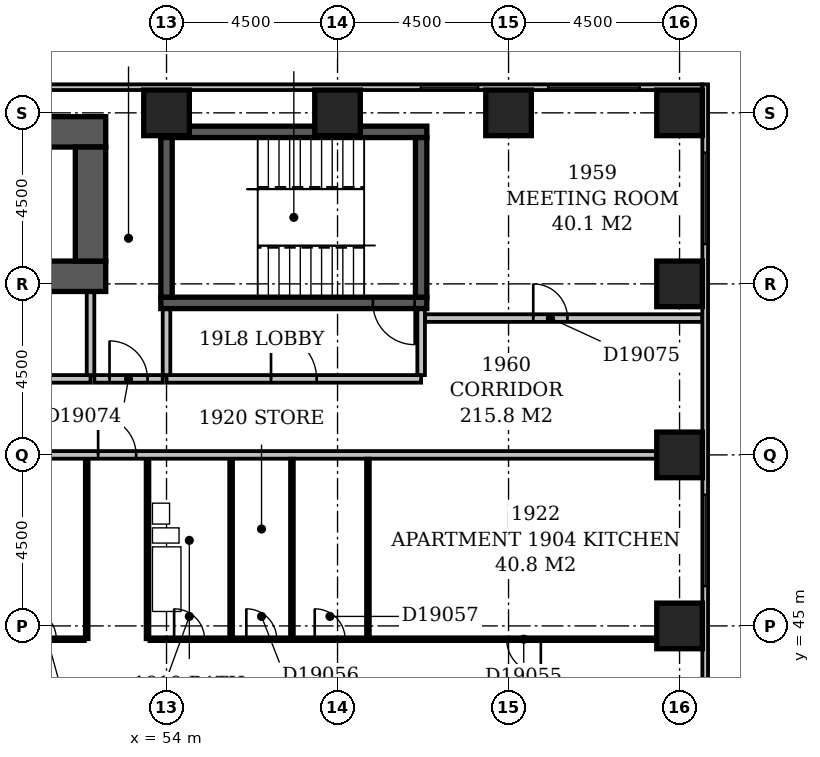
"""IFC4 building model, lengths in metres.
Left out: names, types, materials, properties, quantities, classifications, styles, units other than length and angle.
Written with IfcOpenShell. Run it as: python <this file> out.ifc"""

import sys

from ifc_helpers import new_model, si_unit, direction, frame, frame_2d, origin, origin_2d, place, context, subcontext, project, spatial, rectangle, extrude, element, fill, save


model = new_model("IFC4")
c1 = context("Model", 3, precision=1e-05, world=origin(), true_north=direction((0.0, 1.0)))
c2 = subcontext(c1, "Body", "Model", "MODEL_VIEW")
j1 = project(units=[si_unit("LENGTHUNIT", "METRE"), si_unit("PLANEANGLEUNIT", "RADIAN")], contexts=[c1])
p1 = place(None, origin())
s1 = spatial("IfcSite", under=j1, at=p1, CompositionType="ELEMENT")
p2 = place(p1, origin())
s2 = spatial("IfcBuilding", under=s1, at=p2, CompositionType="ELEMENT")
p3 = place(p2, frame((0.0, 0.0, 79.4)))
s3 = spatial("IfcBuildingStorey", under=s2, at=p3, CompositionType="ELEMENT", Elevation=79.4)
for number, where, z_axis, x_axis in (
    (1, (47.0, 54.2, -0.3), (0.0, 0.0, 1.0), (1.0, 0.0, 0.0)),
    (2, (47.0, 58.0, -0.3), (0.0, 0.0, 1.0), (1.0, 0.0, 0.0)),
):
    element("IfcWall", number, at=place(p3, frame(where, z_axis=z_axis, x_axis=x_axis)), inside=s3, PredefinedType="SHEAR", context=c2, shape_type="SweptSolid", body=[
        extrude(rectangle(XDim=5.4, YDim=0.8, at=frame_2d((2.7, 0.0))), origin(), (0.0, 0.0, 1.0), 3.6),
    ])
p4 = place(p3, frame((52.0, 54.6, -0.3), z_axis=(0.0, 0.0, 1.0), x_axis=(0.0, 1.0, 0.0)))
e3 = element("IfcWall", 3, at=p4, inside=s3, PredefinedType="SHEAR", context=c2, shape_type="SweptSolid", body=[
    extrude(rectangle(XDim=3.0, YDim=0.8, at=frame_2d((1.5, 0.0))), origin(), (0.0, 0.0, 1.0), 3.6),
])
p5 = place(p3, frame((53.85, 53.5, -0.3), z_axis=(0.0, 0.0, 1.0), x_axis=(1.0, 0.0, 0.0)))
e4 = element("IfcWall", 4, at=p5, inside=s3, PredefinedType="SHEAR", context=c2, shape_type="SweptSolid", body=[
    extrude(rectangle(XDim=7.0, YDim=0.3, at=frame_2d((3.5, 0.0))), origin(), (0.0, 0.0, 1.0), 3.6),
])
p6 = place(p5, frame((5.58, 0.0, 0.3)))
e5 = element("IfcOpeningElement", 5, at=p6, cuts=e4, PredefinedType="OPENING", context=c2, shape_type="SweptSolid", body=[
    extrude(rectangle(XDim=1.1, YDim=2.1, at=frame_2d((0.55, 1.05))), frame((0.0, 0.162, 0.0), z_axis=(0.0, -1.0, 0.0), x_axis=(1.0, 0.0, 0.0)), (0.0, 0.0, 1.0), 0.324),
])
p7 = place(p3, frame((53.85, 58.0, -0.3), z_axis=(0.0, 0.0, 1.0), x_axis=(1.0, 0.0, 0.0)))
e6 = element("IfcWall", 6, at=p7, inside=s3, PredefinedType="SHEAR", context=c2, shape_type="SweptSolid", body=[
    extrude(rectangle(XDim=7.0, YDim=0.3, at=frame_2d((3.5, 0.0))), origin(), (0.0, 0.0, 1.0), 3.6),
])
for number, where, z_axis, x_axis in (
    (7, (54.0, 53.65, -0.3), (0.0, 0.0, 1.0), (0.0, 1.0, 0.0)),
    (8, (60.7, 53.65, -0.3), (0.0, 0.0, 1.0), (0.0, 1.0, 0.0)),
):
    element("IfcWall", number, at=place(p3, frame(where, z_axis=z_axis, x_axis=x_axis)), inside=s3, PredefinedType="SHEAR", context=c2, shape_type="SweptSolid", body=[
        extrude(rectangle(XDim=4.2, YDim=0.3, at=frame_2d((2.1, 0.0))), origin(), (0.0, 0.0, 1.0), 3.6),
    ])
for number, where, z_axis, x_axis in (
    (9, (67.5, 45.0, -0.3), (0.0, 0.0, 1.0), (1.0, 0.0, 0.0)),
    (10, (67.5, 49.5, -0.3), (0.0, 0.0, 1.0), (1.0, 0.0, 0.0)),
    (11, (67.5, 54.0, -0.3), (0.0, 0.0, 1.0), (1.0, 0.0, 0.0)),
    (12, (54.0, 58.5, -0.3), (0.0, 0.0, 1.0), (1.0, 0.0, 0.0)),
    (13, (58.5, 58.5, -0.3), (0.0, 0.0, 1.0), (1.0, 0.0, 0.0)),
    (14, (63.0, 58.5, -0.3), (0.0, 0.0, 1.0), (1.0, 0.0, 0.0)),
    (15, (67.5, 58.5, -0.3), (0.0, 0.0, 1.0), (1.0, 0.0, 0.0)),
):
    element("IfcColumn", number, at=place(p3, frame(where, z_axis=z_axis, x_axis=x_axis)), inside=s3, PredefinedType="COLUMN", context=c2, shape_type="SweptSolid", body=[
        extrude(rectangle(XDim=1.2, YDim=1.2, at=origin_2d()), origin(), (0.0, 0.0, 1.0), 3.6),
    ])
p8 = place(p3, frame((68.175, 35.4, 0.0), z_axis=(0.0, 0.0, 1.0), x_axis=(0.0, 1.0, 0.0)))
e16 = element("IfcWall", 16, at=p8, inside=s3, PredefinedType="STANDARD", context=c2, shape_type="SweptSolid", body=[
    extrude(rectangle(XDim=23.85, YDim=0.15, at=frame_2d((11.925, 0.0))), origin(), (0.0, 0.0, 1.0), 2.7),
])
p9 = place(p8, frame((1.65, 0.0, 0.6)))
e17 = element("IfcOpeningElement", 17, at=p9, cuts=e16, PredefinedType="OPENING", context=c2, shape_type="SweptSolid", body=[
    extrude(rectangle(XDim=2.4, YDim=1.8, at=frame_2d((1.2, 0.9))), frame((0.0, 0.087, 0.0), z_axis=(0.0, -1.0, 0.0), x_axis=(1.0, 0.0, 0.0)), (0.0, 0.0, 1.0), 0.174),
])
p10 = place(p8, frame((10.65, 0.0, 0.6)))
e18 = element("IfcOpeningElement", 18, at=p10, cuts=e16, PredefinedType="OPENING", context=c2, shape_type="SweptSolid", body=[
    extrude(rectangle(XDim=2.4, YDim=1.8, at=frame_2d((1.2, 0.9))), frame((0.0, 0.087, 0.0), z_axis=(0.0, -1.0, 0.0), x_axis=(1.0, 0.0, 0.0)), (0.0, 0.0, 1.0), 0.174),
])
p11 = place(p8, frame((19.65, 0.0, 0.6)))
e19 = element("IfcOpeningElement", 19, at=p11, cuts=e16, PredefinedType="OPENING", context=c2, shape_type="SweptSolid", body=[
    extrude(rectangle(XDim=2.4, YDim=1.8, at=frame_2d((1.2, 0.9))), frame((0.0, 0.087, 0.0), z_axis=(0.0, -1.0, 0.0), x_axis=(1.0, 0.0, 0.0)), (0.0, 0.0, 1.0), 0.174),
])
p12 = place(p3, frame((68.1, 59.175, 0.0), z_axis=(0.0, 0.0, 1.0), x_axis=(-1.0, 0.0, 0.0)))
e20 = element("IfcWall", 20, at=p12, inside=s3, PredefinedType="STANDARD", context=c2, shape_type="SweptSolid", body=[
    extrude(rectangle(XDim=68.85, YDim=0.15, at=frame_2d((34.425, 0.0))), origin(), (0.0, 0.0, 1.0), 2.7),
])
p13 = place(p12, frame((1.65, 0.0, 0.6)))
e21 = element("IfcOpeningElement", 21, at=p13, cuts=e20, PredefinedType="OPENING", context=c2, shape_type="SweptSolid", body=[
    extrude(rectangle(XDim=2.4, YDim=1.8, at=frame_2d((1.2, 0.9))), frame((0.0, 0.087, 0.0), z_axis=(0.0, -1.0, 0.0), x_axis=(1.0, 0.0, 0.0)), (0.0, 0.0, 1.0), 0.174),
])
p14 = place(p12, frame((5.903, 0.0, 0.6)))
e22 = element("IfcOpeningElement", 22, at=p14, cuts=e20, PredefinedType="OPENING", context=c2, shape_type="SweptSolid", body=[
    extrude(rectangle(XDim=1.5, YDim=1.8, at=frame_2d((0.75, 0.9))), frame((0.0, 0.087, 0.0), z_axis=(0.0, -1.0, 0.0), x_axis=(1.0, 0.0, 0.0)), (0.0, 0.0, 1.0), 0.174),
])
p15 = place(p12, frame((37.65, 0.0, 0.6)))
e23 = element("IfcOpeningElement", 23, at=p15, cuts=e20, PredefinedType="OPENING", context=c2, shape_type="SweptSolid", body=[
    extrude(rectangle(XDim=2.4, YDim=1.8, at=frame_2d((1.2, 0.9))), frame((0.0, 0.087, 0.0), z_axis=(0.0, -1.0, 0.0), x_axis=(1.0, 0.0, 0.0)), (0.0, 0.0, 1.0), 0.174),
])
p16 = place(p3, frame((47.0, 51.5, 0.0), z_axis=(0.0, 0.0, 1.0), x_axis=(1.0, 0.0, 0.0)))
e24 = element("IfcWall", 24, at=p16, inside=s3, PredefinedType="PARTITIONING", context=c2, shape_type="SweptSolid", body=[
    extrude(rectangle(XDim=5.0, YDim=0.2, at=frame_2d((2.5, 0.0))), origin(), (0.0, 0.0, 1.0), 3.3),
])
p17 = place(p16, frame((1.9, 0.0, 0.0)))
e25 = element("IfcOpeningElement", 25, at=p17, cuts=e24, PredefinedType="OPENING", context=c2, shape_type="SweptSolid", body=[
    extrude(rectangle(XDim=1.2, YDim=2.1, at=frame_2d((0.6, 1.05))), frame((0.0, 0.112, 0.0), z_axis=(0.0, -1.0, 0.0), x_axis=(1.0, 0.0, 0.0)), (0.0, 0.0, 1.0), 0.224),
])
p18 = place(p3, frame((52.0, 51.6, 0.0), z_axis=(0.0, 0.0, 1.0), x_axis=(0.0, 1.0, 0.0)))
e26 = element("IfcWall", 26, at=p18, inside=s3, PredefinedType="PARTITIONING", context=c2, shape_type="SweptSolid", body=[
    extrude(rectangle(XDim=2.18, YDim=0.2, at=frame_2d((1.09, 0.0))), origin(), (0.0, 0.0, 1.0), 3.3),
])
p19 = place(p3, frame((54.0, 51.5, 0.0), z_axis=(0.0, 0.0, 1.0), x_axis=(1.0, 0.0, 0.0)))
e27 = element("IfcWall", 27, at=p19, inside=s3, PredefinedType="PARTITIONING", context=c2, shape_type="SweptSolid", body=[
    extrude(rectangle(XDim=6.7, YDim=0.2, at=frame_2d((3.35, 0.0))), origin(), (0.0, 0.0, 1.0), 3.3),
])
p20 = place(p19, frame((2.75, 0.0, 0.0)))
e28 = element("IfcOpeningElement", 28, at=p20, cuts=e27, PredefinedType="OPENING", context=c2, shape_type="SweptSolid", body=[
    extrude(rectangle(XDim=1.2, YDim=2.1, at=frame_2d((0.6, 1.05))), frame((0.0, 0.112, 0.0), z_axis=(0.0, -1.0, 0.0), x_axis=(1.0, 0.0, 0.0)), (0.0, 0.0, 1.0), 0.224),
])
p21 = place(p3, frame((60.7, 51.6, 0.0), z_axis=(0.0, 0.0, 1.0), x_axis=(0.0, 1.0, 0.0)))
e29 = element("IfcWall", 29, at=p21, inside=s3, PredefinedType="PARTITIONING", context=c2, shape_type="SweptSolid", body=[
    extrude(rectangle(XDim=1.73, YDim=0.2, at=frame_2d((0.865, 0.0))), origin(), (0.0, 0.0, 1.0), 3.3),
])
p22 = place(p3, frame((54.0, 51.6, 0.0), z_axis=(0.0, 0.0, 1.0), x_axis=(0.0, 1.0, 0.0)))
e30 = element("IfcWall", 30, at=p22, inside=s3, PredefinedType="PARTITIONING", context=c2, shape_type="SweptSolid", body=[
    extrude(rectangle(XDim=1.73, YDim=0.2, at=frame_2d((0.865, 0.0))), origin(), (0.0, 0.0, 1.0), 2.6),
])
p23 = place(p3, frame((49.6, 44.65, 0.0), z_axis=(0.0, 0.0, 1.0), x_axis=(1.0, 0.0, 0.0)))
e31 = element("IfcWall", 31, at=p23, inside=s3, PredefinedType="PARTITIONING", context=c2, shape_type="SweptSolid", body=[
    extrude(rectangle(XDim=2.25, YDim=0.1, at=frame_2d((1.125, 0.0))), origin(), (0.0, 0.0, 1.0), 3.3),
])
p24 = place(p23, frame((0.7, 0.0, 0.0)))
e32 = element("IfcOpeningElement", 32, at=p24, cuts=e31, PredefinedType="OPENING", context=c2, shape_type="SweptSolid", body=[
    extrude(rectangle(XDim=0.8, YDim=2.1, at=frame_2d((0.4, 1.05))), frame((0.0, 0.062, 0.0), z_axis=(0.0, -1.0, 0.0), x_axis=(1.0, 0.0, 0.0)), (0.0, 0.0, 1.0), 0.124),
])
p25 = place(p3, frame((51.9, 44.65, 0.0), z_axis=(0.0, 0.0, 1.0), x_axis=(0.0, 1.0, 0.0)))
e33 = element("IfcWall", 33, at=p25, inside=s3, PredefinedType="PLUMBINGWALL", context=c2, shape_type="SweptSolid", body=[
    extrude(rectangle(XDim=4.75, YDim=0.1, at=frame_2d((2.375, 0.0))), origin(), (0.0, 0.0, 1.0), 3.3),
])
p26 = place(p3, frame((53.5, 44.65, 0.0), z_axis=(0.0, 0.0, 1.0), x_axis=(0.0, 1.0, 0.0)))
e34 = element("IfcWall", 34, at=p26, inside=s3, PredefinedType="PLUMBINGWALL", context=c2, shape_type="SweptSolid", body=[
    extrude(rectangle(XDim=4.75, YDim=0.1, at=frame_2d((2.375, 0.0))), origin(), (0.0, 0.0, 1.0), 2.6),
])
p27 = place(p3, frame((53.55, 44.65, 0.0), z_axis=(0.0, 0.0, 1.0), x_axis=(1.0, 0.0, 0.0)))
e35 = element("IfcWall", 35, at=p27, inside=s3, PredefinedType="PARTITIONING", context=c2, shape_type="SweptSolid", body=[
    extrude(rectangle(XDim=13.35, YDim=0.1, at=frame_2d((6.675, 0.0))), origin(), (0.0, 0.0, 1.0), 3.3),
])
p28 = place(p27, frame((0.65, 0.0, 0.0)))
e36 = element("IfcOpeningElement", 36, at=p28, cuts=e35, PredefinedType="OPENING", context=c2, shape_type="SweptSolid", body=[
    extrude(rectangle(XDim=0.8, YDim=2.1, at=frame_2d((0.4, 1.05))), frame((0.0, 0.062, 0.0), z_axis=(0.0, -1.0, 0.0), x_axis=(1.0, 0.0, 0.0)), (0.0, 0.0, 1.0), 0.124),
])
p29 = place(p27, frame((9.4, 0.0, 0.0)))
e37 = element("IfcOpeningElement", 37, at=p29, cuts=e35, PredefinedType="OPENING", context=c2, shape_type="SweptSolid", body=[
    extrude(rectangle(XDim=0.9, YDim=2.1, at=frame_2d((0.45, 1.05))), frame((0.0, 0.062, 0.0), z_axis=(0.0, -1.0, 0.0), x_axis=(1.0, 0.0, 0.0)), (0.0, 0.0, 1.0), 0.124),
])
p30 = place(p27, frame((2.55, 0.0, 0.0)))
e38 = element("IfcOpeningElement", 38, at=p30, cuts=e35, PredefinedType="OPENING", context=c2, shape_type="SweptSolid", body=[
    extrude(rectangle(XDim=0.8, YDim=2.1, at=frame_2d((0.4, 1.05))), frame((0.0, 0.062, 0.0), z_axis=(0.0, -1.0, 0.0), x_axis=(1.0, 0.0, 0.0)), (0.0, 0.0, 1.0), 0.124),
])
p31 = place(p27, frame((4.35, 0.0, 0.0)))
e39 = element("IfcOpeningElement", 39, at=p31, cuts=e35, PredefinedType="OPENING", context=c2, shape_type="SweptSolid", body=[
    extrude(rectangle(XDim=0.8, YDim=2.1, at=frame_2d((0.4, 1.05))), frame((0.0, 0.062, 0.0), z_axis=(0.0, -1.0, 0.0), x_axis=(1.0, 0.0, 0.0)), (0.0, 0.0, 1.0), 0.124),
])
p32 = place(p3, frame((55.7, 44.7, 0.0), z_axis=(0.0, 0.0, 1.0), x_axis=(0.0, 1.0, 0.0)))
e40 = element("IfcWall", 40, at=p32, inside=s3, PredefinedType="PLUMBINGWALL", context=c2, shape_type="SweptSolid", body=[
    extrude(rectangle(XDim=4.7, YDim=0.1, at=frame_2d((2.35, 0.0))), origin(), (0.0, 0.0, 1.0), 3.3),
])
for number, where, z_axis, x_axis in (
    (41, (57.3, 44.7, 0.0), (0.0, 0.0, 1.0), (0.0, 1.0, 0.0)),
    (42, (59.3, 44.7, 0.0), (0.0, 0.0, 1.0), (0.0, 1.0, 0.0)),
):
    element("IfcWall", number, at=place(p3, frame(where, z_axis=z_axis, x_axis=x_axis)), inside=s3, PredefinedType="PARTITIONING", context=c2, shape_type="SweptSolid", body=[
        extrude(rectangle(XDim=4.7, YDim=0.1, at=frame_2d((2.35, 0.0))), origin(), (0.0, 0.0, 1.0), 3.3),
    ])
p33 = place(p3, frame((9.1, 49.5, 0.0), z_axis=(0.0, 0.0, 1.0), x_axis=(1.0, 0.0, 0.0)))
e43 = element("IfcWall", 43, at=p33, inside=s3, PredefinedType="PARTITIONING", context=c2, shape_type="SweptSolid", body=[
    extrude(rectangle(XDim=57.8, YDim=0.2, at=frame_2d((28.9, 0.0))), origin(), (0.0, 0.0, 1.0), 3.3),
])
p34 = place(p33, frame((18.7, 0.0, 0.0)))
e44 = element("IfcOpeningElement", 44, at=p34, cuts=e43, PredefinedType="OPENING", context=c2, shape_type="SweptSolid", body=[
    extrude(rectangle(XDim=1.0, YDim=2.1, at=frame_2d((0.5, 1.05))), frame((0.0, 0.112, 0.0), z_axis=(0.0, -1.0, 0.0), x_axis=(1.0, 0.0, 0.0)), (0.0, 0.0, 1.0), 0.224),
])
p35 = place(p33, frame((24.35, 0.0, 0.0)))
e45 = element("IfcOpeningElement", 45, at=p35, cuts=e43, PredefinedType="OPENING", context=c2, shape_type="SweptSolid", body=[
    extrude(rectangle(XDim=1.0, YDim=2.1, at=frame_2d((0.5, 1.05))), frame((0.0, 0.112, 0.0), z_axis=(0.0, -1.0, 0.0), x_axis=(1.0, 0.0, 0.0)), (0.0, 0.0, 1.0), 0.224),
])
p36 = place(p33, frame((27.2, 0.0, 0.0)))
e46 = element("IfcOpeningElement", 46, at=p36, cuts=e43, PredefinedType="OPENING", context=c2, shape_type="SweptSolid", body=[
    extrude(rectangle(XDim=1.0, YDim=2.1, at=frame_2d((0.5, 1.05))), frame((0.0, 0.112, 0.0), z_axis=(0.0, -1.0, 0.0), x_axis=(1.0, 0.0, 0.0)), (0.0, 0.0, 1.0), 0.224),
])
p37 = place(p33, frame((43.1, 0.0, 0.0)))
e47 = element("IfcOpeningElement", 47, at=p37, cuts=e43, PredefinedType="OPENING", context=c2, shape_type="SweptSolid", body=[
    extrude(rectangle(XDim=1.0, YDim=2.1, at=frame_2d((0.5, 1.05))), frame((0.0, 0.112, 0.0), z_axis=(0.0, -1.0, 0.0), x_axis=(1.0, 0.0, 0.0)), (0.0, 0.0, 1.0), 0.224),
])
p38 = place(p33, frame((3.9, 0.0, 0.0)))
e48 = element("IfcOpeningElement", 48, at=p38, cuts=e43, PredefinedType="OPENING", context=c2, shape_type="SweptSolid", body=[
    extrude(rectangle(XDim=0.9, YDim=2.1, at=frame_2d((0.45, 1.05))), frame((0.0, 0.112, 0.0), z_axis=(0.0, -1.0, 0.0), x_axis=(1.0, 0.0, 0.0)), (0.0, 0.0, 1.0), 0.224),
])
p39 = place(p3, frame((52.1, 51.5, 0.0), z_axis=(0.0, 0.0, 1.0), x_axis=(1.0, 0.0, 0.0)))
e49 = element("IfcWall", 49, at=p39, inside=s3, PredefinedType="PARTITIONING", context=c2, shape_type="SweptSolid", body=[
    extrude(rectangle(XDim=1.8, YDim=0.2, at=frame_2d((0.9, 0.0))), origin(), (0.0, 0.0, 1.0), 3.3),
])
p40 = place(p39, frame((0.4, 0.0, 0.0)))
e50 = element("IfcOpeningElement", 50, at=p40, cuts=e49, PredefinedType="OPENING", context=c2, shape_type="SweptSolid", body=[
    extrude(rectangle(XDim=1.0, YDim=2.1, at=frame_2d((0.5, 1.05))), frame((0.0, 0.112, 0.0), z_axis=(0.0, -1.0, 0.0), x_axis=(1.0, 0.0, 0.0)), (0.0, 0.0, 1.0), 0.224),
])
p41 = place(p3, frame((60.8, 53.1, 0.0), z_axis=(0.0, 0.0, 1.0), x_axis=(1.0, 0.0, 0.0)))
e51 = element("IfcWall", 51, at=p41, inside=s3, PredefinedType="PARTITIONING", context=c2, shape_type="SweptSolid", body=[
    extrude(rectangle(XDim=7.3, YDim=0.2, at=frame_2d((3.65, 0.0))), origin(), (0.0, 0.0, 1.0), 3.3),
])
p42 = place(p41, frame((2.85, 0.0, 0.0)))
e52 = element("IfcOpeningElement", 52, at=p42, cuts=e51, PredefinedType="OPENING", context=c2, shape_type="SweptSolid", body=[
    extrude(rectangle(XDim=0.9, YDim=2.1, at=frame_2d((0.45, 1.05))), frame((0.0, 0.112, 0.0), z_axis=(0.0, -1.0, 0.0), x_axis=(1.0, 0.0, 0.0)), (0.0, 0.0, 1.0), 0.224),
])
p43 = place(p10, origin())
e53 = element("IfcWindow", 53, at=p43, inside=s3, PartitioningType="SINGLE_PANEL", PredefinedType="WINDOW", context=c2, shape_type="SweptSolid", body=[
    extrude(rectangle(XDim=2.4, YDim=1.8, at=frame_2d((1.2, 0.9))), frame((0.0, 0.03, 0.0), z_axis=(0.0, -1.0, 0.0), x_axis=(1.0, 0.0, 0.0)), (0.0, 0.0, 1.0), 0.06),
])
fill(e18, e53)
p44 = place(p11, origin())
e54 = element("IfcWindow", 54, at=p44, inside=s3, PartitioningType="SINGLE_PANEL", PredefinedType="WINDOW", context=c2, shape_type="SweptSolid", body=[
    extrude(rectangle(XDim=2.4, YDim=1.8, at=frame_2d((1.2, 0.9))), frame((0.0, 0.03, 0.0), z_axis=(0.0, -1.0, 0.0), x_axis=(1.0, 0.0, 0.0)), (0.0, 0.0, 1.0), 0.06),
])
fill(e19, e54)
p45 = place(p13, origin())
e55 = element("IfcWindow", 55, at=p45, inside=s3, PartitioningType="SINGLE_PANEL", PredefinedType="WINDOW", context=c2, shape_type="SweptSolid", body=[
    extrude(rectangle(XDim=2.4, YDim=1.8, at=frame_2d((1.2, 0.9))), frame((0.0, 0.03, 0.0), z_axis=(0.0, -1.0, 0.0), x_axis=(1.0, 0.0, 0.0)), (0.0, 0.0, 1.0), 0.06),
])
fill(e21, e55)
p46 = place(p14, origin())
e56 = element("IfcWindow", 56, at=p46, inside=s3, PartitioningType="SINGLE_PANEL", PredefinedType="WINDOW", context=c2, shape_type="SweptSolid", body=[
    extrude(rectangle(XDim=1.5, YDim=1.8, at=frame_2d((0.75, 0.9))), frame((0.0, 0.03, 0.0), z_axis=(0.0, -1.0, 0.0), x_axis=(1.0, 0.0, 0.0)), (0.0, 0.0, 1.0), 0.06),
])
fill(e22, e56)
p47 = place(p20, origin())
e57 = element("IfcDoor", 57, at=p47, inside=s3, OperationType="SINGLE_SWING_LEFT", PredefinedType="DOOR", context=c2, shape_type="SweptSolid", body=[
    extrude(rectangle(XDim=1.2, YDim=2.1, at=frame_2d((0.6, 1.05))), frame((0.0, 0.025, 0.0), z_axis=(0.0, -1.0, 0.0), x_axis=(1.0, 0.0, 0.0)), (0.0, 0.0, 1.0), 0.05),
])
fill(e28, e57)
p48 = place(p6, origin())
e58 = element("IfcDoor", 58, at=p48, inside=s3, OperationType="SINGLE_SWING_RIGHT", PredefinedType="DOOR", context=c2, shape_type="SweptSolid", body=[
    extrude(rectangle(XDim=1.1, YDim=2.1, at=frame_2d((0.55, 1.05))), frame((0.0, 0.025, 0.0), z_axis=(0.0, -1.0, 0.0), x_axis=(1.0, 0.0, 0.0)), (0.0, 0.0, 1.0), 0.05),
])
fill(e5, e58)
p49 = place(p24, origin())
e59 = element("IfcDoor", 59, at=p49, inside=s3, OperationType="SINGLE_SWING_LEFT", PredefinedType="DOOR", context=c2, shape_type="SweptSolid", body=[
    extrude(rectangle(XDim=0.8, YDim=2.1, at=frame_2d((0.4, 1.05))), frame((0.0, 0.025, 0.0), z_axis=(0.0, -1.0, 0.0), x_axis=(1.0, 0.0, 0.0)), (0.0, 0.0, 1.0), 0.05),
])
fill(e32, e59)
p50 = place(p28, origin())
e60 = element("IfcDoor", 60, at=p50, inside=s3, OperationType="SINGLE_SWING_LEFT", PredefinedType="DOOR", context=c2, shape_type="SweptSolid", body=[
    extrude(rectangle(XDim=0.8, YDim=2.1, at=frame_2d((0.4, 1.05))), frame((0.0, 0.025, 0.0), z_axis=(0.0, -1.0, 0.0), x_axis=(1.0, 0.0, 0.0)), (0.0, 0.0, 1.0), 0.05),
])
fill(e36, e60)
p51 = place(p29, origin())
e61 = element("IfcDoor", 61, at=p51, inside=s3, OperationType="SINGLE_SWING_RIGHT", PredefinedType="DOOR", context=c2, shape_type="SweptSolid", body=[
    extrude(rectangle(XDim=0.9, YDim=2.1, at=frame_2d((0.45, 1.05))), frame((0.0, 0.025, 0.0), z_axis=(0.0, -1.0, 0.0), x_axis=(1.0, 0.0, 0.0)), (0.0, 0.0, 1.0), 0.05),
])
fill(e37, e61)
p52 = place(p30, origin())
e62 = element("IfcDoor", 62, at=p52, inside=s3, OperationType="SINGLE_SWING_LEFT", PredefinedType="DOOR", context=c2, shape_type="SweptSolid", body=[
    extrude(rectangle(XDim=0.8, YDim=2.1, at=frame_2d((0.4, 1.05))), frame((0.0, 0.025, 0.0), z_axis=(0.0, -1.0, 0.0), x_axis=(1.0, 0.0, 0.0)), (0.0, 0.0, 1.0), 0.05),
])
fill(e38, e62)
p53 = place(p31, origin())
e63 = element("IfcDoor", 63, at=p53, inside=s3, OperationType="SINGLE_SWING_LEFT", PredefinedType="DOOR", context=c2, shape_type="SweptSolid", body=[
    extrude(rectangle(XDim=0.8, YDim=2.1, at=frame_2d((0.4, 1.05))), frame((0.0, 0.025, 0.0), z_axis=(0.0, -1.0, 0.0), x_axis=(1.0, 0.0, 0.0)), (0.0, 0.0, 1.0), 0.05),
])
fill(e39, e63)
p54 = place(p37, origin())
e64 = element("IfcDoor", 64, at=p54, inside=s3, OperationType="SINGLE_SWING_LEFT", PredefinedType="DOOR", context=c2, shape_type="SweptSolid", body=[
    extrude(rectangle(XDim=1.0, YDim=2.1, at=frame_2d((0.5, 1.05))), frame((0.0, 0.025, 0.0), z_axis=(0.0, -1.0, 0.0), x_axis=(1.0, 0.0, 0.0)), (0.0, 0.0, 1.0), 0.05),
])
fill(e47, e64)
p55 = place(p40, origin())
e65 = element("IfcDoor", 65, at=p55, inside=s3, OperationType="SINGLE_SWING_LEFT", PredefinedType="DOOR", context=c2, shape_type="SweptSolid", body=[
    extrude(rectangle(XDim=1.0, YDim=2.1, at=frame_2d((0.5, 1.05))), frame((0.0, 0.025, 0.0), z_axis=(0.0, -1.0, 0.0), x_axis=(1.0, 0.0, 0.0)), (0.0, 0.0, 1.0), 0.05),
])
fill(e50, e65)
p56 = place(p42, origin())
e66 = element("IfcDoor", 66, at=p56, inside=s3, OperationType="SINGLE_SWING_LEFT", PredefinedType="DOOR", context=c2, shape_type="SweptSolid", body=[
    extrude(rectangle(XDim=0.9, YDim=2.1, at=frame_2d((0.45, 1.05))), frame((0.0, 0.025, 0.0), z_axis=(0.0, -1.0, 0.0), x_axis=(1.0, 0.0, 0.0)), (0.0, 0.0, 1.0), 0.05),
])
fill(e52, e66)
save(model, sys.argv[1])
